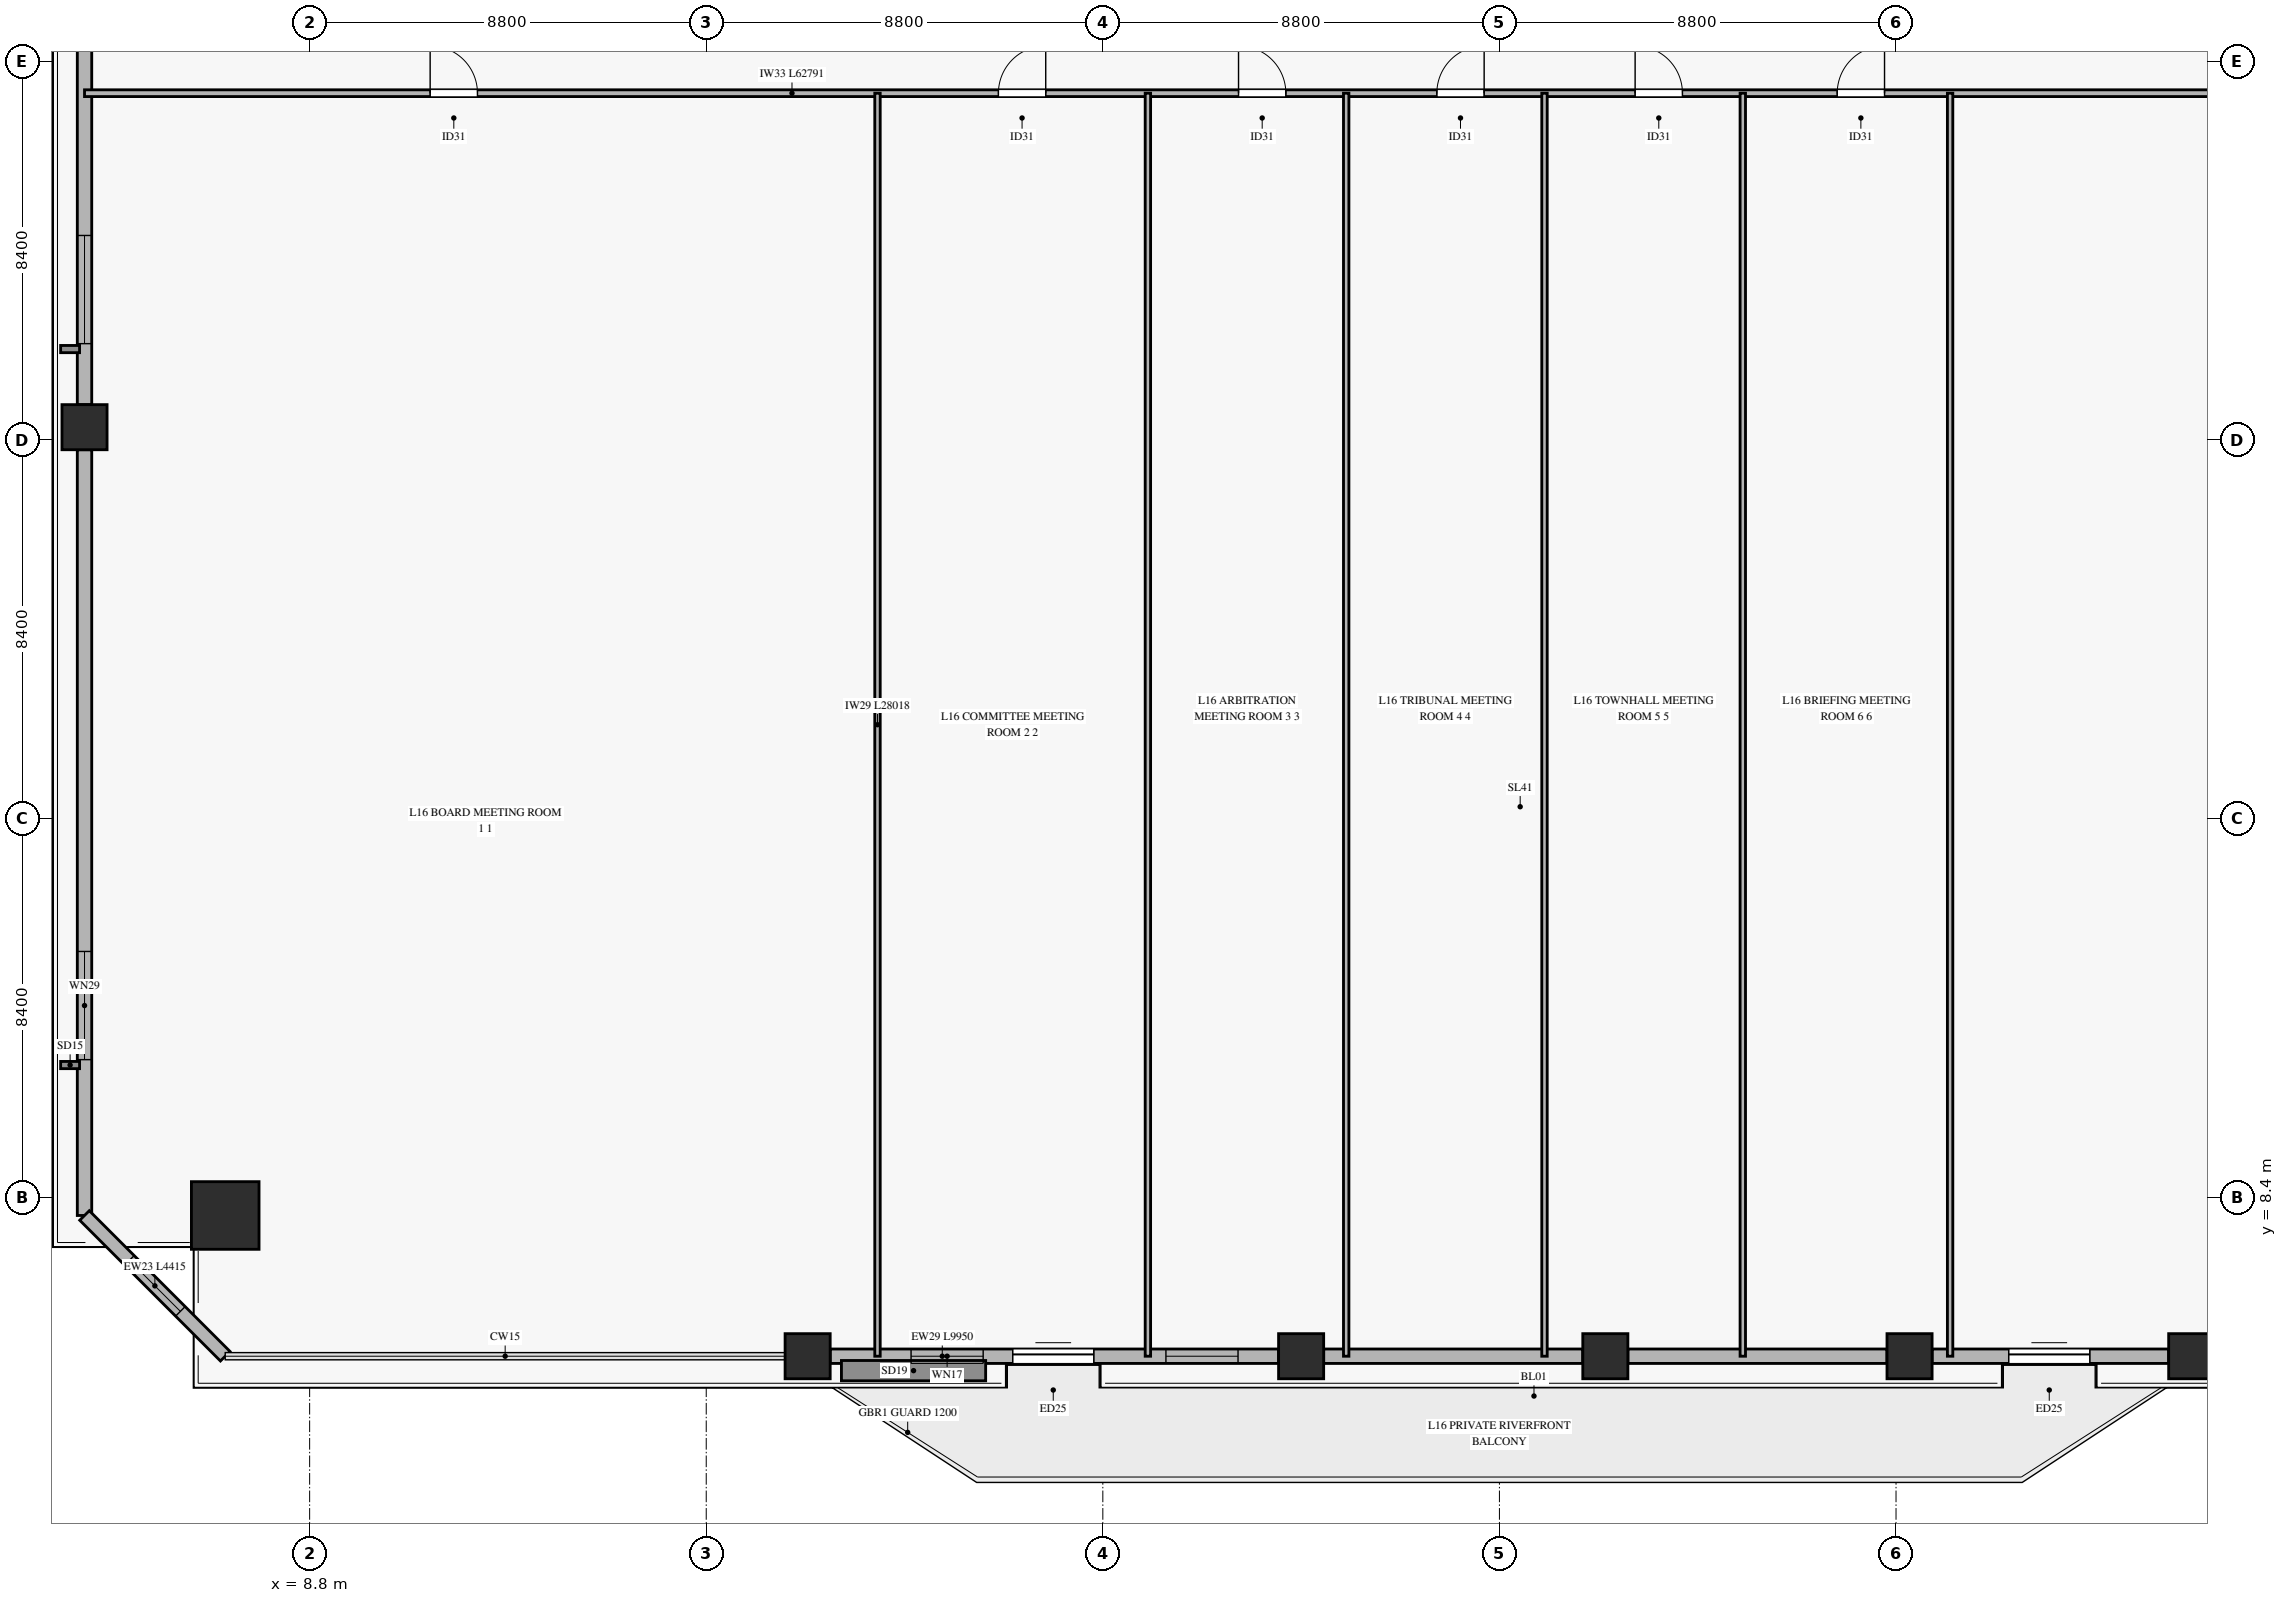
"""IFC4 building model, lengths in metres.
Left out: names, types, materials, properties, quantities, classifications, styles, units other than length and angle.
Written with IfcOpenShell. Run it as: python <this file> out.ifc"""

import sys

from ifc_helpers import new_model, si_unit, direction, frame, frame_2d, origin, origin_2d, place, context, subcontext, project, spatial, rectangle, hollow_rectangle, extrude, source, transform, mapped, element, fill, save


model = new_model("IFC4")
c1 = context("Model", 3, precision=1e-05, world=origin(), true_north=direction((0.0, 1.0)))
c2 = subcontext(c1, "Body", "Model", "MODEL_VIEW")
j1 = project(units=[si_unit("LENGTHUNIT", "METRE"), si_unit("PLANEANGLEUNIT", "RADIAN")], contexts=[c1])
p1 = place(None, origin())
s1 = spatial("IfcSite", under=j1, at=p1, CompositionType="ELEMENT")
p2 = place(p1, origin())
s2 = spatial("IfcBuilding", under=s1, at=p2, CompositionType="ELEMENT")
p3 = place(p2, frame((0.0, 0.0, 65.0)))
s3 = spatial("IfcBuildingStorey", under=s2, at=p3, CompositionType="ELEMENT", Elevation=65.0)
m1 = source(origin(), c2, "Body", "SweptSolid", [
    extrude(hollow_rectangle(XDim=1.5, YDim=1.5, WallThickness=0.07, at=origin_2d()), origin(), (0.0, 0.0, 1.0), 3.68),
])
p4 = place(p3, frame((6.927, 8.004, 0.0), z_axis=(0.0, 0.0, 1.0), x_axis=(1.0, 0.0, 0.0)))
e1 = element("IfcColumn", 1, at=p4, inside=s3, PredefinedType="COLUMN", context=c2, shape_type="MappedRepresentation", body=[
    mapped(m1, transform((0.0, 0.0, 0.0), x_axis=(1.0, 0.0, 0.0), y_axis=(0.0, 1.0, 0.0), z_axis=(0.0, 0.0, 1.0), scale=1.0)),
])
m2 = source(origin(), c2, "Body", "SweptSolid", [
    extrude(hollow_rectangle(XDim=1.0, YDim=1.0, WallThickness=0.045, at=origin_2d()), origin(), (0.0, 0.0, 1.0), 3.68),
])
for number, where, z_axis, x_axis in (
    (2, (19.85, 4.882, 0.0), (0.0, 0.0, 1.0), (1.0, 0.0, 0.0)),
    (3, (30.8, 4.882, 0.0), (0.0, 0.0, 1.0), (1.0, 0.0, 0.0)),
    (4, (37.55, 4.882, 0.0), (0.0, 0.0, 1.0), (1.0, 0.0, 0.0)),
    (5, (44.3, 4.882, 0.0), (0.0, 0.0, 1.0), (1.0, 0.0, 0.0)),
    (6, (50.55, 4.882, 0.0), (0.0, 0.0, 1.0), (1.0, 0.0, 0.0)),
    (7, (3.805, 25.491, 0.0), (0.0, 0.0, 1.0), (1.0, 0.0, 0.0)),
):
    element("IfcColumn", number, at=place(p3, frame(where, z_axis=z_axis, x_axis=x_axis)), inside=s3, PredefinedType="COLUMN", context=c2, shape_type="MappedRepresentation", body=[
        mapped(m2, transform((0.0, 0.0, 0.0), x_axis=(1.0, 0.0, 0.0), y_axis=(0.0, 1.0, 0.0), z_axis=(0.0, 0.0, 1.0), scale=1.0)),
    ])
p5 = place(p3, frame((20.35, 4.882, 0.0), z_axis=(0.0, 0.0, 1.0), x_axis=(1.0, 0.0, 0.0)))
e8 = element("IfcWall", 8, at=p5, inside=s3, PredefinedType="SOLIDWALL", context=c2, shape_type="SweptSolid", body=[
    extrude(rectangle(XDim=9.95, YDim=0.32, at=frame_2d((4.975, 0.0))), origin(), (0.0, 0.0, 1.0), 3.16),
])
p6 = place(p5, frame((4.05, 0.0, 0.0)))
e9 = element("IfcOpeningElement", 9, at=p6, cuts=e8, PredefinedType="OPENING", context=c2, shape_type="SweptSolid", body=[
    extrude(rectangle(XDim=1.8, YDim=2.25, at=frame_2d((0.9, 1.125))), frame((0.0, 0.17, 0.0), z_axis=(0.0, -1.0, 0.0), x_axis=(1.0, 0.0, 0.0)), (0.0, 0.0, 1.0), 0.34),
])
p7 = place(p5, frame((1.795, 0.0, 0.45)))
e10 = element("IfcOpeningElement", 10, at=p7, cuts=e8, PredefinedType="OPENING", context=c2, shape_type="SweptSolid", body=[
    extrude(rectangle(XDim=1.6, YDim=2.0, at=frame_2d((0.8, 1.0))), frame((0.0, 0.17, 0.0), z_axis=(0.0, -1.0, 0.0), x_axis=(1.0, 0.0, 0.0)), (0.0, 0.0, 1.0), 0.34),
])
p8 = place(p5, frame((7.45, 0.0, 0.45)))
e11 = element("IfcOpeningElement", 11, at=p8, cuts=e8, PredefinedType="OPENING", context=c2, shape_type="SweptSolid", body=[
    extrude(rectangle(XDim=1.6, YDim=2.0, at=frame_2d((0.8, 1.0))), frame((0.0, 0.17, 0.0), z_axis=(0.0, -1.0, 0.0), x_axis=(1.0, 0.0, 0.0)), (0.0, 0.0, 1.0), 0.34),
])
for number, where, z_axis, x_axis in (
    (12, (31.3, 4.882, 0.0), (0.0, 0.0, 1.0), (1.0, 0.0, 0.0)),
    (13, (38.05, 4.882, 0.0), (0.0, 0.0, 1.0), (1.0, 0.0, 0.0)),
):
    element("IfcWall", number, at=place(p3, frame(where, z_axis=z_axis, x_axis=x_axis)), inside=s3, PredefinedType="SOLIDWALL", context=c2, shape_type="SweptSolid", body=[
        extrude(rectangle(XDim=5.75, YDim=0.32, at=frame_2d((2.875, 0.0))), origin(), (0.0, 0.0, 1.0), 3.16),
    ])
p9 = place(p3, frame((44.8, 4.882, 0.0), z_axis=(0.0, 0.0, 1.0), x_axis=(1.0, 0.0, 0.0)))
e14 = element("IfcWall", 14, at=p9, inside=s3, PredefinedType="SOLIDWALL", context=c2, shape_type="SweptSolid", body=[
    extrude(rectangle(XDim=5.25, YDim=0.32, at=frame_2d((2.625, 0.0))), origin(), (0.0, 0.0, 1.0), 3.16),
])
p10 = place(p9, frame((1.7, 0.0, 0.0)))
e15 = element("IfcOpeningElement", 15, at=p10, cuts=e14, PredefinedType="OPENING", context=c2, shape_type="SweptSolid", body=[
    extrude(rectangle(XDim=1.8, YDim=2.25, at=frame_2d((0.9, 1.125))), frame((0.0, 0.17, 0.0), z_axis=(0.0, -1.0, 0.0), x_axis=(1.0, 0.0, 0.0)), (0.0, 0.0, 1.0), 0.34),
])
p11 = place(p3, frame((3.805, 8.004, 0.0), z_axis=(0.0, 0.0, 1.0), x_axis=(0.0, 1.0, 0.0)))
e16 = element("IfcWall", 16, at=p11, inside=s3, PredefinedType="SOLIDWALL", context=c2, shape_type="SweptSolid", body=[
    extrude(rectangle(XDim=16.987, YDim=0.32, at=frame_2d((8.494, 0.0))), origin(), (0.0, 0.0, 1.0), 3.16),
])
p12 = place(p11, frame((3.457, 0.0, 0.45)))
e17 = element("IfcOpeningElement", 17, at=p12, cuts=e16, PredefinedType="OPENING", context=c2, shape_type="SweptSolid", body=[
    extrude(rectangle(XDim=2.4, YDim=2.1, at=frame_2d((1.2, 1.05))), frame((0.0, 0.17, 0.0), z_axis=(0.0, -1.0, 0.0), x_axis=(1.0, 0.0, 0.0)), (0.0, 0.0, 1.0), 0.34),
])
p13 = place(p3, frame((3.805, 25.991, 0.0), z_axis=(0.0, 0.0, 1.0), x_axis=(0.0, 1.0, 0.0)))
e18 = element("IfcWall", 18, at=p13, inside=s3, PredefinedType="SOLIDWALL", context=c2, shape_type="SweptSolid", body=[
    extrude(rectangle(XDim=16.987, YDim=0.32, at=frame_2d((8.494, 0.0))), origin(), (0.0, 0.0, 1.0), 3.16),
])
p14 = place(p13, frame((1.353, 0.0, 0.45)))
e19 = element("IfcOpeningElement", 19, at=p14, cuts=e18, PredefinedType="OPENING", context=c2, shape_type="SweptSolid", body=[
    extrude(rectangle(XDim=2.4, YDim=2.1, at=frame_2d((1.2, 1.05))), frame((0.0, 0.17, 0.0), z_axis=(0.0, -1.0, 0.0), x_axis=(1.0, 0.0, 0.0)), (0.0, 0.0, 1.0), 0.34),
])
p15 = place(p13, frame((13.117, 0.0, 0.45)))
e20 = element("IfcOpeningElement", 20, at=p15, cuts=e18, PredefinedType="OPENING", context=c2, shape_type="SweptSolid", body=[
    extrude(rectangle(XDim=2.4, YDim=2.1, at=frame_2d((1.2, 1.05))), frame((0.0, 0.17, 0.0), z_axis=(0.0, -1.0, 0.0), x_axis=(1.0, 0.0, 0.0)), (0.0, 0.0, 1.0), 0.34),
])
p16 = place(p3, frame((3.805, 8.004, 0.0), z_axis=(0.0, 0.0, 1.0), x_axis=(0.707134429005, -0.707079132287, 0.0)))
e21 = element("IfcWall", 21, at=p16, inside=s3, PredefinedType="SOLIDWALL", context=c2, shape_type="SweptSolid", body=[
    extrude(rectangle(XDim=4.415, YDim=0.3, at=frame_2d((2.208, 0.0))), origin(), (0.0, 0.0, 1.0), 3.16),
])
p17 = place(p16, frame((1.408, 0.0, 0.45)))
e22 = element("IfcOpeningElement", 22, at=p17, cuts=e21, PredefinedType="OPENING", context=c2, shape_type="SweptSolid", body=[
    extrude(rectangle(XDim=1.6, YDim=2.0, at=frame_2d((0.8, 1.0))), frame((0.0, 0.16, 0.0), z_axis=(0.0, -1.0, 0.0), x_axis=(1.0, 0.0, 0.0)), (0.0, 0.0, 1.0), 0.32),
])
p18 = place(p3, frame((3.805, 32.9, 0.0), z_axis=(0.0, 0.0, 1.0), x_axis=(1.0, 0.0, 0.0)))
e23 = element("IfcWall", 23, at=p18, inside=s3, PredefinedType="PARTITIONING", context=c2, shape_type="SweptSolid", body=[
    extrude(rectangle(XDim=62.791, YDim=0.15, at=frame_2d((31.396, 0.0))), origin(), (0.0, 0.0, 1.0), 2.765),
])
p19 = place(p18, frame((7.669, 0.0, 0.0)))
e24 = element("IfcOpeningElement", 24, at=p19, cuts=e23, PredefinedType="OPENING", context=c2, shape_type="SweptSolid", body=[
    extrude(rectangle(XDim=1.05, YDim=2.15, at=frame_2d((0.525, 1.075))), frame((0.0, 0.085, 0.0), z_axis=(0.0, -1.0, 0.0), x_axis=(1.0, 0.0, 0.0)), (0.0, 0.0, 1.0), 0.17),
])
p20 = place(p18, frame((20.278, 0.0, 0.0)))
e25 = element("IfcOpeningElement", 25, at=p20, cuts=e23, PredefinedType="OPENING", context=c2, shape_type="SweptSolid", body=[
    extrude(rectangle(XDim=1.05, YDim=2.15, at=frame_2d((0.525, 1.075))), frame((0.0, 0.085, 0.0), z_axis=(0.0, -1.0, 0.0), x_axis=(1.0, 0.0, 0.0)), (0.0, 0.0, 1.0), 0.17),
])
p21 = place(p18, frame((25.606, 0.0, 0.0)))
e26 = element("IfcOpeningElement", 26, at=p21, cuts=e23, PredefinedType="OPENING", context=c2, shape_type="SweptSolid", body=[
    extrude(rectangle(XDim=1.05, YDim=2.15, at=frame_2d((0.525, 1.075))), frame((0.0, 0.085, 0.0), z_axis=(0.0, -1.0, 0.0), x_axis=(1.0, 0.0, 0.0)), (0.0, 0.0, 1.0), 0.17),
])
p22 = place(p18, frame((30.006, 0.0, 0.0)))
e27 = element("IfcOpeningElement", 27, at=p22, cuts=e23, PredefinedType="OPENING", context=c2, shape_type="SweptSolid", body=[
    extrude(rectangle(XDim=1.05, YDim=2.15, at=frame_2d((0.525, 1.075))), frame((0.0, 0.085, 0.0), z_axis=(0.0, -1.0, 0.0), x_axis=(1.0, 0.0, 0.0)), (0.0, 0.0, 1.0), 0.17),
])
p23 = place(p18, frame((34.406, 0.0, 0.0)))
e28 = element("IfcOpeningElement", 28, at=p23, cuts=e23, PredefinedType="OPENING", context=c2, shape_type="SweptSolid", body=[
    extrude(rectangle(XDim=1.05, YDim=2.15, at=frame_2d((0.525, 1.075))), frame((0.0, 0.085, 0.0), z_axis=(0.0, -1.0, 0.0), x_axis=(1.0, 0.0, 0.0)), (0.0, 0.0, 1.0), 0.17),
])
p24 = place(p18, frame((38.89, 0.0, 0.0)))
e29 = element("IfcOpeningElement", 29, at=p24, cuts=e23, PredefinedType="OPENING", context=c2, shape_type="SweptSolid", body=[
    extrude(rectangle(XDim=1.05, YDim=2.15, at=frame_2d((0.525, 1.075))), frame((0.0, 0.085, 0.0), z_axis=(0.0, -1.0, 0.0), x_axis=(1.0, 0.0, 0.0)), (0.0, 0.0, 1.0), 0.17),
])
p25 = place(p18, frame((50.46, 0.0, 0.0)))
e30 = element("IfcOpeningElement", 30, at=p25, cuts=e23, PredefinedType="OPENING", context=c2, shape_type="SweptSolid", body=[
    extrude(rectangle(XDim=1.05, YDim=2.15, at=frame_2d((0.525, 1.075))), frame((0.0, 0.085, 0.0), z_axis=(0.0, -1.0, 0.0), x_axis=(1.0, 0.0, 0.0)), (0.0, 0.0, 1.0), 0.17),
])
for number, where, z_axis, x_axis in (
    (31, (21.4, 4.882, 0.0), (0.0, 0.0, 1.0), (0.0, 1.0, 0.0)),
    (32, (27.4, 4.882, 0.0), (0.0, 0.0, 1.0), (0.0, 1.0, 0.0)),
    (33, (31.8, 4.882, 0.0), (0.0, 0.0, 1.0), (0.0, 1.0, 0.0)),
    (34, (36.2, 4.882, 0.0), (0.0, 0.0, 1.0), (0.0, 1.0, 0.0)),
    (35, (40.6, 4.882, 0.0), (0.0, 0.0, 1.0), (0.0, 1.0, 0.0)),
    (36, (45.2, 4.882, 0.0), (0.0, 0.0, 1.0), (0.0, 1.0, 0.0)),
):
    element("IfcWall", number, at=place(p3, frame(where, z_axis=z_axis, x_axis=x_axis)), inside=s3, PredefinedType="PARTITIONING", context=c2, shape_type="SweptSolid", body=[
        extrude(rectangle(XDim=28.018, YDim=0.12, at=frame_2d((14.009, 0.0))), origin(), (0.0, 0.0, 1.0), 3.165),
    ])
m3 = source(origin(), c2, "Body", "SweptSolid", [
    extrude(rectangle(XDim=1.8, YDim=2.25, at=frame_2d((0.9, 1.125))), frame((0.0, 0.025, 0.0), z_axis=(0.0, -1.0, 0.0), x_axis=(1.0, 0.0, 0.0)), (0.0, 0.0, 1.0), 0.05),
])
p26 = place(p6, origin())
e37 = element("IfcDoor", 37, at=p26, inside=s3, OperationType="SLIDING_TO_LEFT", PredefinedType="DOOR", context=c2, shape_type="MappedRepresentation", body=[
    mapped(m3, transform((0.0, 0.0, 0.0), x_axis=(1.0, 0.0, 0.0), y_axis=(0.0, 1.0, 0.0), z_axis=(0.0, 0.0, 1.0), scale=1.0)),
])
fill(e9, e37)
m4 = source(origin(), c2, "Body", "SweptSolid", [
    extrude(rectangle(XDim=1.6, YDim=2.0, at=frame_2d((0.8, 1.0))), frame((0.0, 0.03, 0.0), z_axis=(0.0, -1.0, 0.0), x_axis=(1.0, 0.0, 0.0)), (0.0, 0.0, 1.0), 0.06),
])
p27 = place(p7, origin())
e38 = element("IfcWindow", 38, at=p27, inside=s3, PartitioningType="SINGLE_PANEL", PredefinedType="WINDOW", context=c2, shape_type="MappedRepresentation", body=[
    mapped(m4, transform((0.0, 0.0, 0.0), x_axis=(1.0, 0.0, 0.0), y_axis=(0.0, 1.0, 0.0), z_axis=(0.0, 0.0, 1.0), scale=1.0)),
])
fill(e10, e38)
p28 = place(p8, origin())
e39 = element("IfcWindow", 39, at=p28, inside=s3, PartitioningType="SINGLE_PANEL", PredefinedType="WINDOW", context=c2, shape_type="MappedRepresentation", body=[
    mapped(m4, transform((0.0, 0.0, 0.0), x_axis=(1.0, 0.0, 0.0), y_axis=(0.0, 1.0, 0.0), z_axis=(0.0, 0.0, 1.0), scale=1.0)),
])
fill(e11, e39)
p29 = place(p10, origin())
e40 = element("IfcDoor", 40, at=p29, inside=s3, OperationType="SLIDING_TO_LEFT", PredefinedType="DOOR", context=c2, shape_type="MappedRepresentation", body=[
    mapped(m3, transform((0.0, 0.0, 0.0), x_axis=(1.0, 0.0, 0.0), y_axis=(0.0, 1.0, 0.0), z_axis=(0.0, 0.0, 1.0), scale=1.0)),
])
fill(e15, e40)
m5 = source(origin(), c2, "Body", "SweptSolid", [
    extrude(rectangle(XDim=2.4, YDim=2.1, at=frame_2d((1.2, 1.05))), frame((0.0, 0.03, 0.0), z_axis=(0.0, -1.0, 0.0), x_axis=(1.0, 0.0, 0.0)), (0.0, 0.0, 1.0), 0.06),
])
p30 = place(p12, origin())
e41 = element("IfcWindow", 41, at=p30, inside=s3, PartitioningType="SINGLE_PANEL", PredefinedType="WINDOW", context=c2, shape_type="MappedRepresentation", body=[
    mapped(m5, transform((0.0, 0.0, 0.0), x_axis=(1.0, 0.0, 0.0), y_axis=(0.0, 1.0, 0.0), z_axis=(0.0, 0.0, 1.0), scale=1.0)),
])
fill(e17, e41)
p31 = place(p14, origin())
e42 = element("IfcWindow", 42, at=p31, inside=s3, PartitioningType="SINGLE_PANEL", PredefinedType="WINDOW", context=c2, shape_type="MappedRepresentation", body=[
    mapped(m5, transform((0.0, 0.0, 0.0), x_axis=(1.0, 0.0, 0.0), y_axis=(0.0, 1.0, 0.0), z_axis=(0.0, 0.0, 1.0), scale=1.0)),
])
fill(e19, e42)
p32 = place(p17, origin())
e43 = element("IfcWindow", 43, at=p32, inside=s3, PartitioningType="SINGLE_PANEL", PredefinedType="WINDOW", context=c2, shape_type="MappedRepresentation", body=[
    mapped(m4, transform((0.0, 0.0, 0.0), x_axis=(1.0, 0.0, 0.0), y_axis=(0.0, 1.0, 0.0), z_axis=(0.0, 0.0, 1.0), scale=1.0)),
])
fill(e22, e43)
m6 = source(origin(), c2, "Body", "SweptSolid", [
    extrude(rectangle(XDim=1.05, YDim=2.15, at=frame_2d((0.525, 1.075))), frame((0.0, 0.025, 0.0), z_axis=(0.0, -1.0, 0.0), x_axis=(1.0, 0.0, 0.0)), (0.0, 0.0, 1.0), 0.05),
])
p33 = place(p19, origin())
e44 = element("IfcDoor", 44, at=p33, inside=s3, OperationType="SINGLE_SWING_LEFT", PredefinedType="DOOR", context=c2, shape_type="MappedRepresentation", body=[
    mapped(m6, transform((0.0, 0.0, 0.0), x_axis=(1.0, 0.0, 0.0), y_axis=(0.0, 1.0, 0.0), z_axis=(0.0, 0.0, 1.0), scale=1.0)),
])
fill(e24, e44)
p34 = place(p20, origin())
e45 = element("IfcDoor", 45, at=p34, inside=s3, OperationType="SINGLE_SWING_RIGHT", PredefinedType="DOOR", context=c2, shape_type="MappedRepresentation", body=[
    mapped(m6, transform((0.0, 0.0, 0.0), x_axis=(1.0, 0.0, 0.0), y_axis=(0.0, 1.0, 0.0), z_axis=(0.0, 0.0, 1.0), scale=1.0)),
])
fill(e25, e45)
p35 = place(p21, origin())
e46 = element("IfcDoor", 46, at=p35, inside=s3, OperationType="SINGLE_SWING_LEFT", PredefinedType="DOOR", context=c2, shape_type="MappedRepresentation", body=[
    mapped(m6, transform((0.0, 0.0, 0.0), x_axis=(1.0, 0.0, 0.0), y_axis=(0.0, 1.0, 0.0), z_axis=(0.0, 0.0, 1.0), scale=1.0)),
])
fill(e26, e46)
p36 = place(p22, origin())
e47 = element("IfcDoor", 47, at=p36, inside=s3, OperationType="SINGLE_SWING_RIGHT", PredefinedType="DOOR", context=c2, shape_type="MappedRepresentation", body=[
    mapped(m6, transform((0.0, 0.0, 0.0), x_axis=(1.0, 0.0, 0.0), y_axis=(0.0, 1.0, 0.0), z_axis=(0.0, 0.0, 1.0), scale=1.0)),
])
fill(e27, e47)
p37 = place(p23, origin())
e48 = element("IfcDoor", 48, at=p37, inside=s3, OperationType="SINGLE_SWING_LEFT", PredefinedType="DOOR", context=c2, shape_type="MappedRepresentation", body=[
    mapped(m6, transform((0.0, 0.0, 0.0), x_axis=(1.0, 0.0, 0.0), y_axis=(0.0, 1.0, 0.0), z_axis=(0.0, 0.0, 1.0), scale=1.0)),
])
fill(e28, e48)
p38 = place(p24, origin())
e49 = element("IfcDoor", 49, at=p38, inside=s3, OperationType="SINGLE_SWING_RIGHT", PredefinedType="DOOR", context=c2, shape_type="MappedRepresentation", body=[
    mapped(m6, transform((0.0, 0.0, 0.0), x_axis=(1.0, 0.0, 0.0), y_axis=(0.0, 1.0, 0.0), z_axis=(0.0, 0.0, 1.0), scale=1.0)),
])
fill(e29, e49)
save(model, sys.argv[1])
